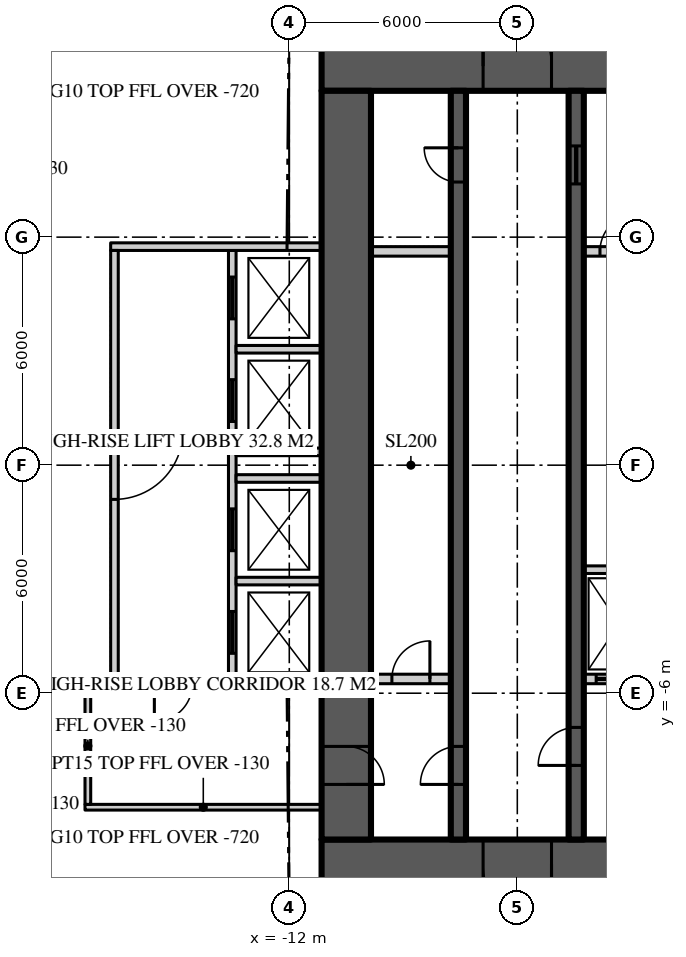
"""IFC4 building model, lengths in metres.
Left out: names, types, materials, properties, quantities, classifications, styles, units other than length and angle.
Written with IfcOpenShell. Run it as: python <this file> out.ifc"""

import sys

from ifc_helpers import new_model, si_unit, direction, frame, frame_2d, origin, place, context, subcontext, project, spatial, rectangle, extrude, element, fill, save


model = new_model("IFC4")
c1 = context("Model", 3, precision=1e-05, world=origin(), true_north=direction((0.0, 1.0)))
c2 = subcontext(c1, "Body", "Model", "MODEL_VIEW")
j1 = project(units=[si_unit("LENGTHUNIT", "METRE"), si_unit("PLANEANGLEUNIT", "RADIAN")], contexts=[c1])
p1 = place(None, origin())
s1 = spatial("IfcSite", under=j1, at=p1, CompositionType="ELEMENT")
p2 = place(p1, origin())
s2 = spatial("IfcBuilding", under=s1, at=p2, CompositionType="ELEMENT")
p3 = place(p2, frame((0.0, 0.0, 208.8)))
s3 = spatial("IfcBuildingStorey", under=s2, at=p3, CompositionType="ELEMENT", Elevation=208.8)
p4 = place(p3, frame((-11.15, 10.5, 0.0), z_axis=(0.0, 0.0, 1.0), x_axis=(1.0, 0.0, 0.0)))
e1 = element("IfcWall", 1, at=p4, inside=s3, PredefinedType="SHEAR", context=c2, shape_type="SweptSolid", body=[
    extrude(rectangle(XDim=22.3, YDim=1.3, at=frame_2d((11.15, 0.0))), origin(), (0.0, 0.0, 1.0), 3.9),
])
p5 = place(p4, frame((4.25, 0.0, 0.0)))
e2 = element("IfcOpeningElement", 2, at=p5, cuts=e1, PredefinedType="OPENING", context=c2, shape_type="SweptSolid", body=[
    extrude(rectangle(XDim=1.8, YDim=2.2, at=frame_2d((0.9, 1.1))), frame((0.0, 0.66, 0.0), z_axis=(0.0, -1.0, 0.0), x_axis=(1.0, 0.0, 0.0)), (0.0, 0.0, 1.0), 1.32),
])
p6 = place(p4, frame((16.25, 0.0, 0.0)))
e3 = element("IfcOpeningElement", 3, at=p6, cuts=e1, PredefinedType="OPENING", context=c2, shape_type="SweptSolid", body=[
    extrude(rectangle(XDim=1.8, YDim=2.2, at=frame_2d((0.9, 1.1))), frame((0.0, 0.66, 0.0), z_axis=(0.0, -1.0, 0.0), x_axis=(1.0, 0.0, 0.0)), (0.0, 0.0, 1.0), 1.32),
])
p7 = place(p3, frame((11.15, -10.5, 0.0), z_axis=(0.0, 0.0, 1.0), x_axis=(-1.0, 0.0, 0.0)))
e4 = element("IfcWall", 4, at=p7, inside=s3, PredefinedType="SHEAR", context=c2, shape_type="SweptSolid", body=[
    extrude(rectangle(XDim=22.3, YDim=1.3, at=frame_2d((11.15, 0.0))), origin(), (0.0, 0.0, 1.0), 3.9),
])
p8 = place(p7, frame((16.25, 0.0, 0.0)))
e5 = element("IfcOpeningElement", 5, at=p8, cuts=e4, PredefinedType="OPENING", context=c2, shape_type="SweptSolid", body=[
    extrude(rectangle(XDim=1.8, YDim=2.2, at=frame_2d((0.9, 1.1))), frame((0.0, 0.66, 0.0), z_axis=(0.0, -1.0, 0.0), x_axis=(1.0, 0.0, 0.0)), (0.0, 0.0, 1.0), 1.32),
])
p9 = place(p7, frame((4.25, 0.0, 0.0)))
e6 = element("IfcOpeningElement", 6, at=p9, cuts=e4, PredefinedType="OPENING", context=c2, shape_type="SweptSolid", body=[
    extrude(rectangle(XDim=1.8, YDim=2.2, at=frame_2d((0.9, 1.1))), frame((0.0, 0.66, 0.0), z_axis=(0.0, -1.0, 0.0), x_axis=(1.0, 0.0, 0.0)), (0.0, 0.0, 1.0), 1.32),
])
p10 = place(p3, frame((-10.5, 9.85, 0.0), z_axis=(0.0, 0.0, 1.0), x_axis=(0.0, -1.0, 0.0)))
e7 = element("IfcWall", 7, at=p10, inside=s3, PredefinedType="SHEAR", context=c2, shape_type="SweptSolid", body=[
    extrude(rectangle(XDim=19.7, YDim=1.3, at=frame_2d((9.85, 0.0))), origin(), (0.0, 0.0, 1.0), 3.9),
])
p11 = place(p10, frame((17.25, 0.0, 0.0)))
e8 = element("IfcOpeningElement", 8, at=p11, cuts=e7, PredefinedType="OPENING", context=c2, shape_type="SweptSolid", body=[
    extrude(rectangle(XDim=1.0, YDim=2.2, at=frame_2d((0.5, 1.1))), frame((0.0, 0.66, 0.0), z_axis=(0.0, -1.0, 0.0), x_axis=(1.0, 0.0, 0.0)), (0.0, 0.0, 1.0), 1.32),
])
p12 = place(p3, frame((-7.55, -9.85, 0.0), z_axis=(0.0, 0.0, 1.0), x_axis=(0.0, 1.0, 0.0)))
e9 = element("IfcWall", 9, at=p12, inside=s3, PredefinedType="SHEAR", context=c2, shape_type="SweptSolid", body=[
    extrude(rectangle(XDim=19.7, YDim=0.4, at=frame_2d((9.85, 0.0))), origin(), (0.0, 0.0, 1.0), 3.9),
])
p13 = place(p12, frame((1.45, 0.0, 0.0)))
e10 = element("IfcOpeningElement", 10, at=p13, cuts=e9, PredefinedType="OPENING", context=c2, shape_type="SweptSolid", body=[
    extrude(rectangle(XDim=1.0, YDim=2.2, at=frame_2d((0.5, 1.1))), frame((0.0, 0.21, 0.0), z_axis=(0.0, -1.0, 0.0), x_axis=(1.0, 0.0, 0.0)), (0.0, 0.0, 1.0), 0.42),
])
p14 = place(p12, frame((17.3, 0.0, 0.0)))
e11 = element("IfcOpeningElement", 11, at=p14, cuts=e9, PredefinedType="OPENING", context=c2, shape_type="SweptSolid", body=[
    extrude(rectangle(XDim=0.9, YDim=2.1, at=frame_2d((0.45, 1.05))), frame((0.0, 0.21, 0.0), z_axis=(0.0, -1.0, 0.0), x_axis=(1.0, 0.0, 0.0)), (0.0, 0.0, 1.0), 0.42),
])
p15 = place(p3, frame((-4.45, -9.85, 0.0), z_axis=(0.0, 0.0, 1.0), x_axis=(0.0, 1.0, 0.0)))
e12 = element("IfcWall", 12, at=p15, inside=s3, PredefinedType="SHEAR", context=c2, shape_type="SweptSolid", body=[
    extrude(rectangle(XDim=19.7, YDim=0.4, at=frame_2d((9.85, 0.0))), origin(), (0.0, 0.0, 1.0), 3.9),
])
p16 = place(p15, frame((1.95, 0.0, 0.0)))
e13 = element("IfcOpeningElement", 13, at=p16, cuts=e12, PredefinedType="OPENING", context=c2, shape_type="SweptSolid", body=[
    extrude(rectangle(XDim=1.0, YDim=2.2, at=frame_2d((0.5, 1.1))), frame((0.0, 0.21, 0.0), z_axis=(0.0, -1.0, 0.0), x_axis=(1.0, 0.0, 0.0)), (0.0, 0.0, 1.0), 0.42),
])
p17 = place(p15, frame((17.25, 0.0, 0.0)))
e14 = element("IfcOpeningElement", 14, at=p17, cuts=e12, PredefinedType="OPENING", context=c2, shape_type="SweptSolid", body=[
    extrude(rectangle(XDim=1.0, YDim=2.1, at=frame_2d((0.5, 1.05))), frame((0.0, 0.21, 0.0), z_axis=(0.0, -1.0, 0.0), x_axis=(1.0, 0.0, 0.0)), (0.0, 0.0, 1.0), 0.42),
])
p18 = place(p3, frame((-9.85, 5.625, 0.0), z_axis=(0.0, 0.0, 1.0), x_axis=(1.0, 0.0, 0.0)))
e15 = element("IfcWall", 15, at=p18, inside=s3, PredefinedType="SOLIDWALL", context=c2, shape_type="SweptSolid", body=[
    extrude(rectangle(XDim=2.1, YDim=0.25, at=frame_2d((1.05, 0.0))), origin(), (0.0, 0.0, 1.0), 3.7),
])
p19 = place(p3, frame((-4.25, 5.625, 0.0), z_axis=(0.0, 0.0, 1.0), x_axis=(1.0, 0.0, 0.0)))
e16 = element("IfcWall", 16, at=p19, inside=s3, PredefinedType="SOLIDWALL", context=c2, shape_type="SweptSolid", body=[
    extrude(rectangle(XDim=1.85, YDim=0.25, at=frame_2d((0.925, 0.0))), origin(), (0.0, 0.0, 1.0), 3.7),
])
p20 = place(p19, frame((0.425, 0.0, 0.0)))
e17 = element("IfcOpeningElement", 17, at=p20, cuts=e16, PredefinedType="OPENING", context=c2, shape_type="SweptSolid", body=[
    extrude(rectangle(XDim=1.0, YDim=2.2, at=frame_2d((0.5, 1.1))), frame((0.0, 0.135, 0.0), z_axis=(0.0, -1.0, 0.0), x_axis=(1.0, 0.0, 0.0)), (0.0, 0.0, 1.0), 0.27),
])
p21 = place(p3, frame((-9.85, -5.625, 0.0), z_axis=(0.0, 0.0, 1.0), x_axis=(1.0, 0.0, 0.0)))
e18 = element("IfcWall", 18, at=p21, inside=s3, PredefinedType="SOLIDWALL", context=c2, shape_type="SweptSolid", body=[
    extrude(rectangle(XDim=2.1, YDim=0.25, at=frame_2d((1.05, 0.0))), origin(), (0.0, 0.0, 1.0), 3.7),
])
p22 = place(p21, frame((0.55, 0.0, 0.0)))
e19 = element("IfcOpeningElement", 19, at=p22, cuts=e18, PredefinedType="OPENING", context=c2, shape_type="SweptSolid", body=[
    extrude(rectangle(XDim=1.0, YDim=2.2, at=frame_2d((0.5, 1.1))), frame((0.0, 0.135, 0.0), z_axis=(0.0, -1.0, 0.0), x_axis=(1.0, 0.0, 0.0)), (0.0, 0.0, 1.0), 0.27),
])
p23 = place(p3, frame((-4.25, -5.625, 0.0), z_axis=(0.0, 0.0, 1.0), x_axis=(1.0, 0.0, 0.0)))
e20 = element("IfcWall", 20, at=p23, inside=s3, PredefinedType="SOLIDWALL", context=c2, shape_type="SweptSolid", body=[
    extrude(rectangle(XDim=1.85, YDim=0.25, at=frame_2d((0.925, 0.0))), origin(), (0.0, 0.0, 1.0), 3.7),
])
p24 = place(p23, frame((0.325, 0.0, 0.0)))
e21 = element("IfcOpeningElement", 21, at=p24, cuts=e20, PredefinedType="OPENING", context=c2, shape_type="SweptSolid", body=[
    extrude(rectangle(XDim=1.2, YDim=2.2, at=frame_2d((0.6, 1.1))), frame((0.0, 0.135, 0.0), z_axis=(0.0, -1.0, 0.0), x_axis=(1.0, 0.0, 0.0)), (0.0, 0.0, 1.0), 0.27),
])
p25 = place(p3, frame((-4.25, -2.75, 0.0), z_axis=(0.0, 0.0, 1.0), x_axis=(1.0, 0.0, 0.0)))
e22 = element("IfcWall", 22, at=p25, inside=s3, PredefinedType="SOLIDWALL", context=c2, shape_type="SweptSolid", body=[
    extrude(rectangle(XDim=1.85, YDim=0.2, at=frame_2d((0.925, 0.0))), origin(), (0.0, 0.0, 1.0), 3.7),
])
p26 = place(p3, frame((-13.5, 5.65, 0.0), z_axis=(0.0, 0.0, 1.0), x_axis=(0.0, -1.0, 0.0)))
e23 = element("IfcWall", 23, at=p26, inside=s3, PredefinedType="SOLIDWALL", context=c2, shape_type="SweptSolid", body=[
    extrude(rectangle(XDim=11.3, YDim=0.2, at=frame_2d((5.65, 0.0))), origin(), (0.0, 0.0, 1.0), 3.7),
])
p27 = place(p26, frame((0.7, 0.0, 0.0)))
e24 = element("IfcOpeningElement", 24, at=p27, cuts=e23, PredefinedType="OPENING", context=c2, shape_type="SweptSolid", body=[
    extrude(rectangle(XDim=1.1, YDim=2.2, at=frame_2d((0.55, 1.1))), frame((0.0, 0.11, 0.0), z_axis=(0.0, -1.0, 0.0), x_axis=(1.0, 0.0, 0.0)), (0.0, 0.0, 1.0), 0.22),
])
p28 = place(p26, frame((3.4, 0.0, 0.0)))
e25 = element("IfcOpeningElement", 25, at=p28, cuts=e23, PredefinedType="OPENING", context=c2, shape_type="SweptSolid", body=[
    extrude(rectangle(XDim=1.1, YDim=2.2, at=frame_2d((0.55, 1.1))), frame((0.0, 0.11, 0.0), z_axis=(0.0, -1.0, 0.0), x_axis=(1.0, 0.0, 0.0)), (0.0, 0.0, 1.0), 0.22),
])
p29 = place(p26, frame((6.8, 0.0, 0.0)))
e26 = element("IfcOpeningElement", 26, at=p29, cuts=e23, PredefinedType="OPENING", context=c2, shape_type="SweptSolid", body=[
    extrude(rectangle(XDim=1.1, YDim=2.2, at=frame_2d((0.55, 1.1))), frame((0.0, 0.11, 0.0), z_axis=(0.0, -1.0, 0.0), x_axis=(1.0, 0.0, 0.0)), (0.0, 0.0, 1.0), 0.22),
])
p30 = place(p26, frame((9.5, 0.0, 0.0)))
e27 = element("IfcOpeningElement", 27, at=p30, cuts=e23, PredefinedType="OPENING", context=c2, shape_type="SweptSolid", body=[
    extrude(rectangle(XDim=1.1, YDim=2.2, at=frame_2d((0.55, 1.1))), frame((0.0, 0.11, 0.0), z_axis=(0.0, -1.0, 0.0), x_axis=(1.0, 0.0, 0.0)), (0.0, 0.0, 1.0), 0.22),
])
p31 = place(p3, frame((-11.15, 5.75, 0.0), z_axis=(0.0, 0.0, 1.0), x_axis=(-1.0, 0.0, 0.0)))
e28 = element("IfcWall", 28, at=p31, inside=s3, PredefinedType="SOLIDWALL", context=c2, shape_type="SweptSolid", body=[
    extrude(rectangle(XDim=5.55, YDim=0.2, at=frame_2d((2.775, 0.0))), origin(), (0.0, 0.0, 1.0), 3.7),
])
p32 = place(p3, frame((-11.15, -5.75, 0.0), z_axis=(0.0, 0.0, 1.0), x_axis=(-1.0, 0.0, 0.0)))
e29 = element("IfcWall", 29, at=p32, inside=s3, PredefinedType="SOLIDWALL", context=c2, shape_type="SweptSolid", body=[
    extrude(rectangle(XDim=5.55, YDim=0.2, at=frame_2d((2.775, 0.0))), origin(), (0.0, 0.0, 1.0), 3.7),
])
p33 = place(p32, frame((3.4, 0.0, 0.0)))
e30 = element("IfcOpeningElement", 30, at=p33, cuts=e29, PredefinedType="OPENING", context=c2, shape_type="SweptSolid", body=[
    extrude(rectangle(XDim=1.0, YDim=2.2, at=frame_2d((0.5, 1.1))), frame((0.0, 0.11, 0.0), z_axis=(0.0, -1.0, 0.0), x_axis=(1.0, 0.0, 0.0)), (0.0, 0.0, 1.0), 0.22),
])
for number, where, z_axis, x_axis in (
    (31, (-11.15, 3.05, 0.0), (0.0, 0.0, 1.0), (-1.0, 0.0, 0.0)),
    (32, (-11.15, 0.35, 0.0), (0.0, 0.0, 1.0), (-1.0, 0.0, 0.0)),
    (33, (-11.15, -0.35, 0.0), (0.0, 0.0, 1.0), (-1.0, 0.0, 0.0)),
    (34, (-11.15, -3.05, 0.0), (0.0, 0.0, 1.0), (-1.0, 0.0, 0.0)),
):
    element("IfcWall", number, at=place(p3, frame(where, z_axis=z_axis, x_axis=x_axis)), inside=s3, PredefinedType="SOLIDWALL", context=c2, shape_type="SweptSolid", body=[
        extrude(rectangle(XDim=2.25, YDim=0.2, at=frame_2d((1.125, 0.0))), origin(), (0.0, 0.0, 1.0), 3.7),
    ])
p34 = place(p3, frame((-16.6, 5.65, 0.0), z_axis=(0.0, 0.0, 1.0), x_axis=(0.0, -1.0, 0.0)))
e35 = element("IfcWall", 35, at=p34, inside=s3, PredefinedType="SOLIDWALL", context=c2, shape_type="SweptSolid", body=[
    extrude(rectangle(XDim=11.3, YDim=0.2, at=frame_2d((5.65, 0.0))), origin(), (0.0, 0.0, 1.0), 3.18),
])
p35 = place(p34, frame((4.75, 0.0, 0.0)))
e36 = element("IfcOpeningElement", 36, at=p35, cuts=e35, PredefinedType="OPENING", context=c2, shape_type="SweptSolid", body=[
    extrude(rectangle(XDim=1.8, YDim=2.2, at=frame_2d((0.9, 1.1))), frame((0.0, 0.11, 0.0), z_axis=(0.0, -1.0, 0.0), x_axis=(1.0, 0.0, 0.0)), (0.0, 0.0, 1.0), 0.22),
])
p36 = place(p3, frame((-11.15, -9.0, 0.0), z_axis=(0.0, 0.0, 1.0), x_axis=(-1.0, 0.0, 0.0)))
e37 = element("IfcWall", 37, at=p36, inside=s3, PredefinedType="PARTITIONING", context=c2, shape_type="SweptSolid", body=[
    extrude(rectangle(XDim=6.225, YDim=0.15, at=frame_2d((3.113, 0.0))), origin(), (0.0, 0.0, 1.0), 3.77),
])
p37 = place(p3, frame((-17.3, -5.85, 0.0), z_axis=(0.0, 0.0, 1.0), x_axis=(0.0, -1.0, 0.0)))
e38 = element("IfcWall", 38, at=p37, inside=s3, PredefinedType="PARTITIONING", context=c2, shape_type="SweptSolid", body=[
    extrude(rectangle(XDim=3.075, YDim=0.15, at=frame_2d((1.538, 0.0))), origin(), (0.0, 0.0, 1.0), 3.77),
])
p38 = place(p5, origin())
e39 = element("IfcDoor", 39, at=p38, inside=s3, OperationType="DOUBLE_DOOR_DOUBLE_SWING", PredefinedType="DOOR", context=c2, shape_type="SweptSolid", body=[
    extrude(rectangle(XDim=1.8, YDim=2.2, at=frame_2d((0.9, 1.1))), frame((0.0, 0.025, 0.0), z_axis=(0.0, -1.0, 0.0), x_axis=(1.0, 0.0, 0.0)), (0.0, 0.0, 1.0), 0.05),
])
fill(e2, e39)
p39 = place(p8, origin())
e40 = element("IfcDoor", 40, at=p39, inside=s3, OperationType="DOUBLE_DOOR_DOUBLE_SWING", PredefinedType="DOOR", context=c2, shape_type="SweptSolid", body=[
    extrude(rectangle(XDim=1.8, YDim=2.2, at=frame_2d((0.9, 1.1))), frame((0.0, 0.025, 0.0), z_axis=(0.0, -1.0, 0.0), x_axis=(1.0, 0.0, 0.0)), (0.0, 0.0, 1.0), 0.05),
])
fill(e5, e40)
p40 = place(p13, origin())
e41 = element("IfcDoor", 41, at=p40, inside=s3, OperationType="SINGLE_SWING_LEFT", PredefinedType="DOOR", context=c2, shape_type="SweptSolid", body=[
    extrude(rectangle(XDim=1.0, YDim=2.2, at=frame_2d((0.5, 1.1))), frame((0.0, 0.025, 0.0), z_axis=(0.0, -1.0, 0.0), x_axis=(1.0, 0.0, 0.0)), (0.0, 0.0, 1.0), 0.05),
])
fill(e10, e41)
p41 = place(p11, origin())
e42 = element("IfcDoor", 42, at=p41, inside=s3, OperationType="SINGLE_SWING_RIGHT", PredefinedType="DOOR", context=c2, shape_type="SweptSolid", body=[
    extrude(rectangle(XDim=1.0, YDim=2.2, at=frame_2d((0.5, 1.1))), frame((0.0, 0.025, 0.0), z_axis=(0.0, -1.0, 0.0), x_axis=(1.0, 0.0, 0.0)), (0.0, 0.0, 1.0), 0.05),
])
fill(e8, e42)
p42 = place(p16, origin())
e43 = element("IfcDoor", 43, at=p42, inside=s3, OperationType="SINGLE_SWING_LEFT", PredefinedType="DOOR", context=c2, shape_type="SweptSolid", body=[
    extrude(rectangle(XDim=1.0, YDim=2.2, at=frame_2d((0.5, 1.1))), frame((0.0, 0.025, 0.0), z_axis=(0.0, -1.0, 0.0), x_axis=(1.0, 0.0, 0.0)), (0.0, 0.0, 1.0), 0.05),
])
fill(e13, e43)
p43 = place(p14, origin())
e44 = element("IfcDoor", 44, at=p43, inside=s3, OperationType="SINGLE_SWING_RIGHT", PredefinedType="DOOR", context=c2, shape_type="SweptSolid", body=[
    extrude(rectangle(XDim=0.9, YDim=2.1, at=frame_2d((0.45, 1.05))), frame((0.0, 0.025, 0.0), z_axis=(0.0, -1.0, 0.0), x_axis=(1.0, 0.0, 0.0)), (0.0, 0.0, 1.0), 0.05),
])
fill(e11, e44)
p44 = place(p17, origin())
e45 = element("IfcDoor", 45, at=p44, inside=s3, OperationType="SLIDING_TO_LEFT", PredefinedType="DOOR", context=c2, shape_type="SweptSolid", body=[
    extrude(rectangle(XDim=1.0, YDim=2.1, at=frame_2d((0.5, 1.05))), frame((0.0, 0.025, 0.0), z_axis=(0.0, -1.0, 0.0), x_axis=(1.0, 0.0, 0.0)), (0.0, 0.0, 1.0), 0.05),
])
fill(e14, e45)
p45 = place(p24, origin())
e46 = element("IfcDoor", 46, at=p45, inside=s3, OperationType="SLIDING_TO_LEFT", PredefinedType="DOOR", context=c2, shape_type="SweptSolid", body=[
    extrude(rectangle(XDim=1.2, YDim=2.2, at=frame_2d((0.6, 1.1))), frame((0.0, 0.025, 0.0), z_axis=(0.0, -1.0, 0.0), x_axis=(1.0, 0.0, 0.0)), (0.0, 0.0, 1.0), 0.05),
])
fill(e21, e46)
p46 = place(p35, origin())
e47 = element("IfcDoor", 47, at=p46, inside=s3, OperationType="DOUBLE_DOOR_DOUBLE_SWING", PredefinedType="DOOR", context=c2, shape_type="SweptSolid", body=[
    extrude(rectangle(XDim=1.8, YDim=2.2, at=frame_2d((0.9, 1.1))), frame((0.0, 0.025, 0.0), z_axis=(0.0, -1.0, 0.0), x_axis=(1.0, 0.0, 0.0)), (0.0, 0.0, 1.0), 0.05),
])
fill(e36, e47)
p47 = place(p27, origin())
e48 = element("IfcDoor", 48, at=p47, inside=s3, OperationType="SLIDING_TO_LEFT", PredefinedType="DOOR", context=c2, shape_type="SweptSolid", body=[
    extrude(rectangle(XDim=1.1, YDim=2.2, at=frame_2d((0.55, 1.1))), frame((0.0, 0.025, 0.0), z_axis=(0.0, -1.0, 0.0), x_axis=(1.0, 0.0, 0.0)), (0.0, 0.0, 1.0), 0.05),
])
fill(e24, e48)
p48 = place(p28, origin())
e49 = element("IfcDoor", 49, at=p48, inside=s3, OperationType="SLIDING_TO_LEFT", PredefinedType="DOOR", context=c2, shape_type="SweptSolid", body=[
    extrude(rectangle(XDim=1.1, YDim=2.2, at=frame_2d((0.55, 1.1))), frame((0.0, 0.025, 0.0), z_axis=(0.0, -1.0, 0.0), x_axis=(1.0, 0.0, 0.0)), (0.0, 0.0, 1.0), 0.05),
])
fill(e25, e49)
p49 = place(p29, origin())
e50 = element("IfcDoor", 50, at=p49, inside=s3, OperationType="SLIDING_TO_LEFT", PredefinedType="DOOR", context=c2, shape_type="SweptSolid", body=[
    extrude(rectangle(XDim=1.1, YDim=2.2, at=frame_2d((0.55, 1.1))), frame((0.0, 0.025, 0.0), z_axis=(0.0, -1.0, 0.0), x_axis=(1.0, 0.0, 0.0)), (0.0, 0.0, 1.0), 0.05),
])
fill(e26, e50)
p50 = place(p30, origin())
e51 = element("IfcDoor", 51, at=p50, inside=s3, OperationType="SLIDING_TO_LEFT", PredefinedType="DOOR", context=c2, shape_type="SweptSolid", body=[
    extrude(rectangle(XDim=1.1, YDim=2.2, at=frame_2d((0.55, 1.1))), frame((0.0, 0.025, 0.0), z_axis=(0.0, -1.0, 0.0), x_axis=(1.0, 0.0, 0.0)), (0.0, 0.0, 1.0), 0.05),
])
fill(e27, e51)
p51 = place(p33, origin())
e52 = element("IfcDoor", 52, at=p51, inside=s3, OperationType="SINGLE_SWING_RIGHT", PredefinedType="DOOR", context=c2, shape_type="SweptSolid", body=[
    extrude(rectangle(XDim=1.0, YDim=2.2, at=frame_2d((0.5, 1.1))), frame((0.0, 0.025, 0.0), z_axis=(0.0, -1.0, 0.0), x_axis=(1.0, 0.0, 0.0)), (0.0, 0.0, 1.0), 0.05),
])
fill(e30, e52)
p52 = place(p22, origin())
e53 = element("IfcDoor", 53, at=p52, inside=s3, OperationType="SINGLE_SWING_RIGHT", PredefinedType="DOOR", context=c2, shape_type="SweptSolid", body=[
    extrude(rectangle(XDim=1.0, YDim=2.2, at=frame_2d((0.5, 1.1))), frame((0.0, 0.025, 0.0), z_axis=(0.0, -1.0, 0.0), x_axis=(1.0, 0.0, 0.0)), (0.0, 0.0, 1.0), 0.05),
])
fill(e19, e53)
p53 = place(p20, origin())
e54 = element("IfcDoor", 54, at=p53, inside=s3, OperationType="SINGLE_SWING_RIGHT", PredefinedType="DOOR", context=c2, shape_type="SweptSolid", body=[
    extrude(rectangle(XDim=1.0, YDim=2.2, at=frame_2d((0.5, 1.1))), frame((0.0, 0.025, 0.0), z_axis=(0.0, -1.0, 0.0), x_axis=(1.0, 0.0, 0.0)), (0.0, 0.0, 1.0), 0.05),
])
fill(e17, e54)
save(model, sys.argv[1])
